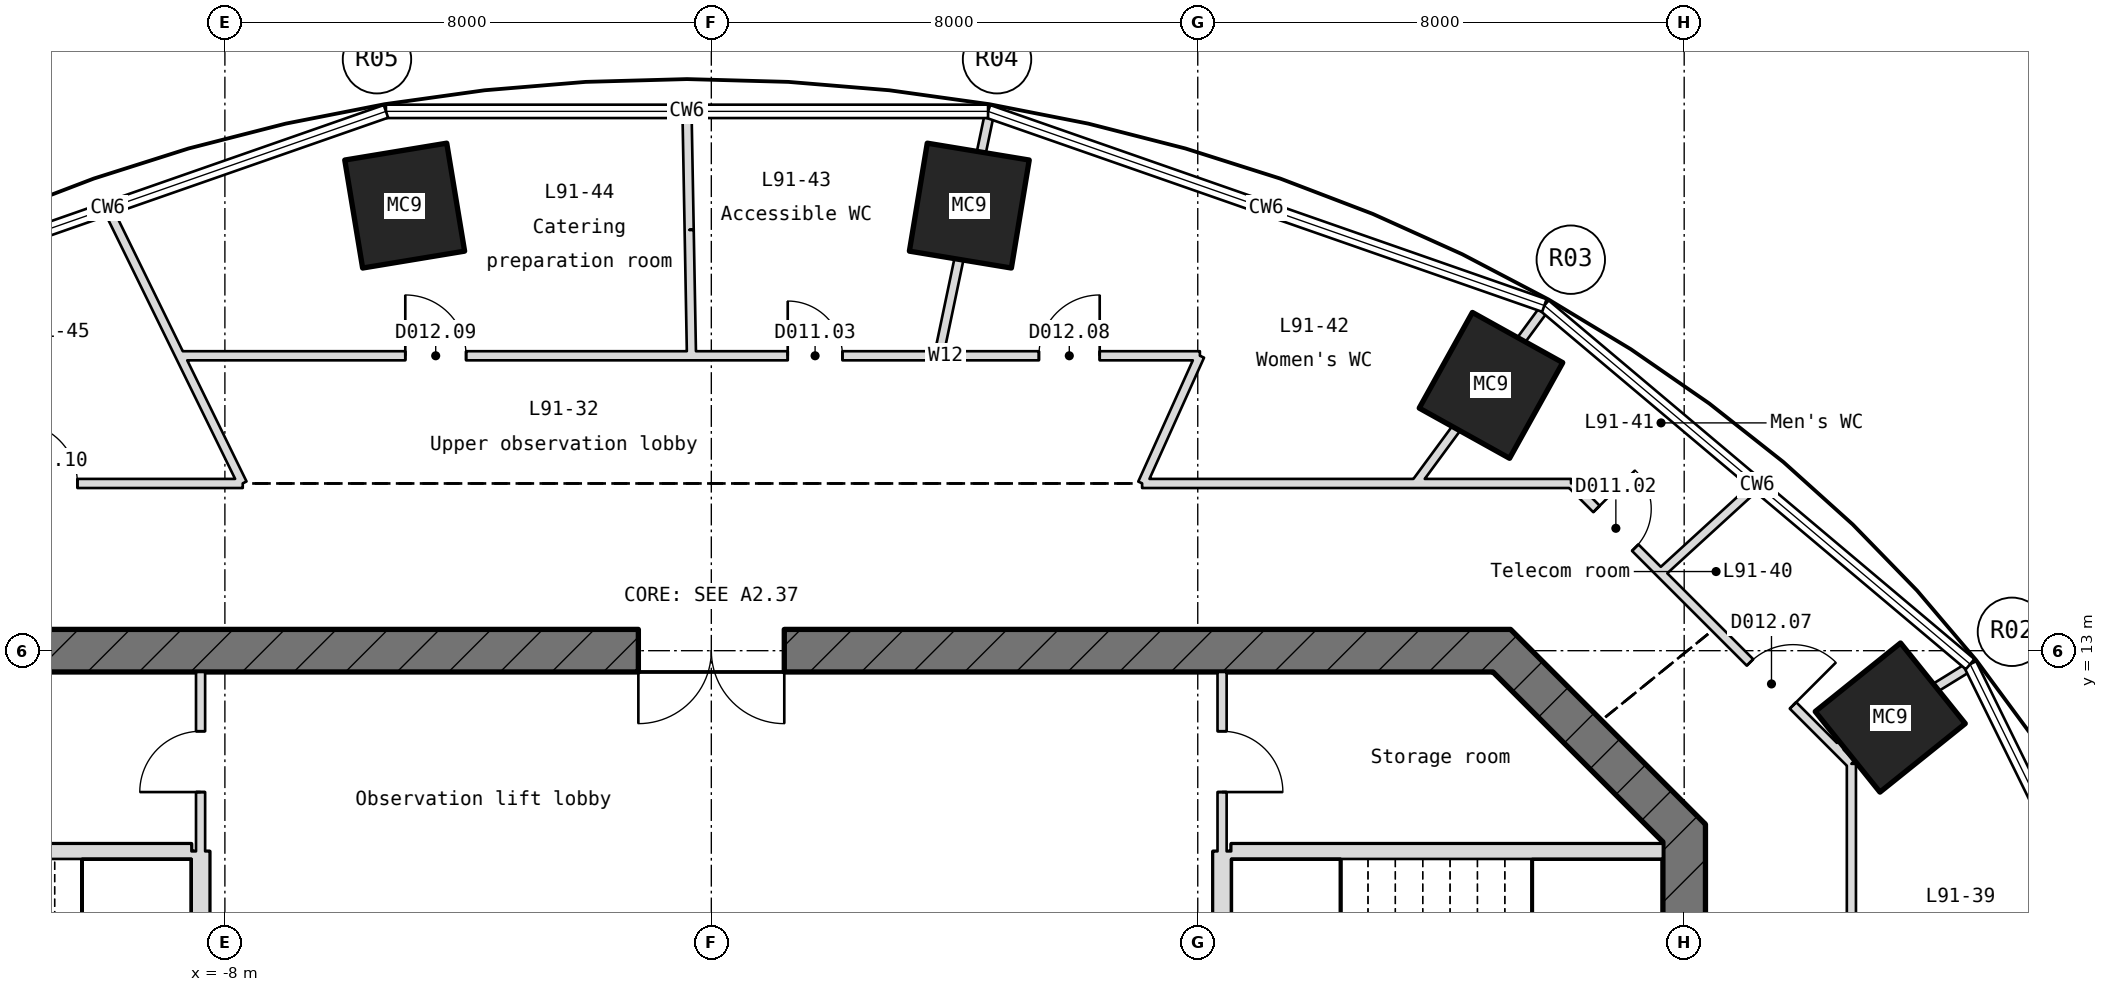
"""IFC4 building model, lengths in metres.
Left out: names, types, materials, properties, quantities, classifications, styles, units other than length and angle.
Written with IfcOpenShell. Run it as: python <this file> out.ifc"""

import sys

from ifc_helpers import new_model, si_unit, direction, frame, frame_2d, origin, origin_2d, place, context, subcontext, project, spatial, rectangle, hollow_rectangle, extrude, element, fill, save


model = new_model("IFC4")
c1 = context("Model", 3, precision=1e-05, world=origin(), true_north=direction((0.0, 1.0)))
c2 = subcontext(c1, "Body", "Model", "MODEL_VIEW")
j1 = project(units=[si_unit("LENGTHUNIT", "METRE"), si_unit("PLANEANGLEUNIT", "RADIAN")], contexts=[c1])
p1 = place(None, origin())
s1 = spatial("IfcSite", under=j1, at=p1, CompositionType="ELEMENT")
p2 = place(p1, origin())
s2 = spatial("IfcBuilding", under=s1, at=p2, CompositionType="ELEMENT")
p3 = place(p2, frame((0.0, 0.0, 401.95)))
s3 = spatial("IfcBuildingStorey", under=s2, at=p3, CompositionType="ELEMENT", Elevation=401.95)
for number, where, z_axis, x_axis in (
    (1, (19.389, 11.9, -0.25), (0.0, 0.0, 1.0), (0.626, -0.78, 0.0)),
    (2, (12.823, 17.363, -0.25), (0.0, 0.0, 1.0), (0.874, -0.486, 0.0)),
    (3, (4.243, 20.32, -0.25), (0.0, 0.0, 1.0), (0.987, -0.163, 0.0)),
    (4, (-5.043, 20.32, -0.25), (0.0, 0.0, 1.0), (0.987, 0.163, 0.0)),
):
    element("IfcColumn", number, at=place(p3, frame(where, z_axis=z_axis, x_axis=x_axis)), inside=s3, PredefinedType="COLUMN", context=c2, shape_type="SweptSolid", body=[
        extrude(hollow_rectangle(XDim=1.7, YDim=1.8, WallThickness=0.05, at=origin_2d()), origin(), (0.0, 0.0, 1.0), 5.55),
    ])
p4 = place(p3, frame((16.0, -10.145, -0.25), z_axis=(0.0, 0.0, 1.0), x_axis=(0.0, 1.0, 0.0)))
e5 = element("IfcWall", 5, at=p4, inside=s3, PredefinedType="SHEAR", context=c2, shape_type="SweptSolid", body=[
    extrude(rectangle(XDim=20.29, YDim=0.7, at=frame_2d((10.145, 0.0))), origin(), (0.0, 0.0, 1.0), 5.55),
])
p5 = place(p4, frame((8.945, 0.0, 0.25)))
e6 = element("IfcOpeningElement", 6, at=p5, cuts=e5, PredefinedType="OPENING", context=c2, shape_type="SweptSolid", body=[
    extrude(rectangle(XDim=2.4, YDim=2.1, at=frame_2d((1.2, 1.05))), frame((0.0, 0.36, 0.0), z_axis=(0.0, -1.0, 0.0), x_axis=(1.0, 0.0, 0.0)), (0.0, 0.0, 1.0), 0.72),
])
p6 = place(p4, frame((13.545, 0.0, 0.25)))
e7 = element("IfcOpeningElement", 7, at=p6, cuts=e5, PredefinedType="OPENING", context=c2, shape_type="SweptSolid", body=[
    extrude(rectangle(XDim=1.2, YDim=2.1, at=frame_2d((0.6, 1.05))), frame((0.0, 0.36, 0.0), z_axis=(0.0, -1.0, 0.0), x_axis=(1.0, 0.0, 0.0)), (0.0, 0.0, 1.0), 0.72),
])
p7 = place(p4, frame((2.4, 0.0, 0.25)))
e8 = element("IfcOpeningElement", 8, at=p7, cuts=e5, PredefinedType="OPENING", context=c2, shape_type="SweptSolid", body=[
    extrude(rectangle(XDim=1.2, YDim=2.1, at=frame_2d((0.6, 1.05))), frame((0.0, 0.36, 0.0), z_axis=(0.0, -1.0, 0.0), x_axis=(1.0, 0.0, 0.0)), (0.0, 0.0, 1.0), 0.72),
])
p8 = place(p3, frame((16.103, 9.897, -0.25), z_axis=(0.0, 0.0, 1.0), x_axis=(-0.707106781187, 0.707106781187, 0.0)))
e9 = element("IfcWall", 9, at=p8, inside=s3, PredefinedType="SHEAR", context=c2, shape_type="SweptSolid", body=[
    extrude(rectangle(XDim=4.533, YDim=0.7, at=frame_2d((2.266, 0.0))), origin(), (0.0, 0.0, 1.0), 5.55),
])
p9 = place(p3, frame((13.145, 13.0, -0.25), z_axis=(0.0, 0.0, 1.0), x_axis=(-1.0, 0.0, 0.0)))
e10 = element("IfcWall", 10, at=p9, inside=s3, PredefinedType="SHEAR", context=c2, shape_type="SweptSolid", body=[
    extrude(rectangle(XDim=26.29, YDim=0.7, at=frame_2d((13.145, 0.0))), origin(), (0.0, 0.0, 1.0), 5.55),
])
p10 = place(p9, frame((11.945, 0.0, 0.25)))
e11 = element("IfcOpeningElement", 11, at=p10, cuts=e10, PredefinedType="OPENING", context=c2, shape_type="SweptSolid", body=[
    extrude(rectangle(XDim=2.4, YDim=2.1, at=frame_2d((1.2, 1.05))), frame((0.0, 0.36, 0.0), z_axis=(0.0, -1.0, 0.0), x_axis=(1.0, 0.0, 0.0)), (0.0, 0.0, 1.0), 0.72),
])
for number, where, z_axis, x_axis in (
    (12, (-15.65, 9.7, -0.25), (0.0, 0.0, 1.0), (1.0, 0.0, 0.0)),
    (13, (8.55, 9.7, -0.25), (0.0, 0.0, 1.0), (1.0, 0.0, 0.0)),
):
    element("IfcWall", number, at=place(p3, frame(where, z_axis=z_axis, x_axis=x_axis)), inside=s3, PredefinedType="SHEAR", context=c2, shape_type="SweptSolid", body=[
        extrude(rectangle(XDim=7.1, YDim=0.25, at=frame_2d((3.55, 0.0))), origin(), (0.0, 0.0, 1.0), 5.55),
    ])
p11 = place(p3, frame((-8.4, 8.35, -0.25), z_axis=(0.0, 0.0, 1.0), x_axis=(0.0, 1.0, 0.0)))
e14 = element("IfcWall", 14, at=p11, inside=s3, PredefinedType="SHEAR", context=c2, shape_type="SweptSolid", body=[
    extrude(rectangle(XDim=1.35, YDim=0.3, at=frame_2d((0.675, 0.0))), origin(), (0.0, 0.0, 1.0), 5.55),
])
p12 = place(p3, frame((-8.4, 9.7, 0.0), z_axis=(0.0, 0.0, 1.0), x_axis=(0.0, 1.0, 0.0)))
e15 = element("IfcWall", 15, at=p12, inside=s3, PredefinedType="PARTITIONING", context=c2, shape_type="SweptSolid", body=[
    extrude(rectangle(XDim=2.95, YDim=0.15, at=frame_2d((1.475, 0.0))), origin(), (0.0, 0.0, 1.0), 5.3),
])
p13 = place(p12, frame((0.975, 0.0, 0.0)))
e16 = element("IfcOpeningElement", 16, at=p13, cuts=e15, PredefinedType="OPENING", context=c2, shape_type="SweptSolid", body=[
    extrude(rectangle(XDim=1.0, YDim=2.1, at=frame_2d((0.5, 1.05))), frame((0.0, 0.085, 0.0), z_axis=(0.0, -1.0, 0.0), x_axis=(1.0, 0.0, 0.0)), (0.0, 0.0, 1.0), 0.17),
])
p14 = place(p3, frame((8.4, 8.35, -0.25), z_axis=(0.0, 0.0, 1.0), x_axis=(0.0, 1.0, 0.0)))
e17 = element("IfcWall", 17, at=p14, inside=s3, PredefinedType="SHEAR", context=c2, shape_type="SweptSolid", body=[
    extrude(rectangle(XDim=1.35, YDim=0.3, at=frame_2d((0.675, 0.0))), origin(), (0.0, 0.0, 1.0), 5.55),
])
p15 = place(p3, frame((8.4, 9.7, 0.0), z_axis=(0.0, 0.0, 1.0), x_axis=(0.0, 1.0, 0.0)))
e18 = element("IfcWall", 18, at=p15, inside=s3, PredefinedType="PARTITIONING", context=c2, shape_type="SweptSolid", body=[
    extrude(rectangle(XDim=2.95, YDim=0.15, at=frame_2d((1.475, 0.0))), origin(), (0.0, 0.0, 1.0), 5.3),
])
p16 = place(p15, frame((0.975, 0.0, 0.0)))
e19 = element("IfcOpeningElement", 19, at=p16, cuts=e18, PredefinedType="OPENING", context=c2, shape_type="SweptSolid", body=[
    extrude(rectangle(XDim=1.0, YDim=2.1, at=frame_2d((0.5, 1.05))), frame((0.0, 0.085, 0.0), z_axis=(0.0, -1.0, 0.0), x_axis=(1.0, 0.0, 0.0)), (0.0, 0.0, 1.0), 0.17),
])
p17 = place(p3, frame((-14.139, 15.75, 0.0), z_axis=(0.0, 0.0, 1.0), x_axis=(1.0, 0.0, 0.0)))
e20 = element("IfcWall", 20, at=p17, inside=s3, PredefinedType="PARTITIONING", context=c2, shape_type="SweptSolid", body=[
    extrude(rectangle(XDim=6.433, YDim=0.15, at=frame_2d((3.216, 0.0))), origin(), (0.0, 0.0, 1.0), 5.3),
])
p18 = place(p17, frame((2.714, 0.0, 0.0)))
e21 = element("IfcOpeningElement", 21, at=p18, cuts=e20, PredefinedType="OPENING", context=c2, shape_type="SweptSolid", body=[
    extrude(rectangle(XDim=1.0, YDim=2.1, at=frame_2d((0.5, 1.05))), frame((0.0, 0.085, 0.0), z_axis=(0.0, -1.0, 0.0), x_axis=(1.0, 0.0, 0.0)), (0.0, 0.0, 1.0), 0.17),
])
p19 = place(p3, frame((-8.74, 17.85, 0.0), z_axis=(0.0, 0.0, 1.0), x_axis=(1.0, 0.0, 0.0)))
e22 = element("IfcWall", 22, at=p19, inside=s3, PredefinedType="PARTITIONING", context=c2, shape_type="SweptSolid", body=[
    extrude(rectangle(XDim=8.418, YDim=0.15, at=frame_2d((4.209, 0.0))), origin(), (0.0, 0.0, 1.0), 5.3),
])
p20 = place(p19, frame((3.707, 0.0, 0.0)))
e23 = element("IfcOpeningElement", 23, at=p20, cuts=e22, PredefinedType="OPENING", context=c2, shape_type="SweptSolid", body=[
    extrude(rectangle(XDim=1.0, YDim=2.1, at=frame_2d((0.5, 1.05))), frame((0.0, 0.085, 0.0), z_axis=(0.0, -1.0, 0.0), x_axis=(1.0, 0.0, 0.0)), (0.0, 0.0, 1.0), 0.17),
])
p21 = place(p3, frame((18.501, 11.388, 0.0), z_axis=(0.0, 0.0, 1.0), x_axis=(0.851577096896, 0.524229384946, 0.0)))
e24 = element("IfcWall", 24, at=p21, inside=s3, PredefinedType="PARTITIONING", context=c2, shape_type="SweptSolid", body=[
    extrude(rectangle(XDim=2.581, YDim=0.15, at=frame_2d((1.29, 0.0))), origin(), (0.0, 0.0, 1.0), 5.3),
])
p22 = place(p3, frame((18.75, -11.139, 0.0), z_axis=(0.0, 0.0, 1.0), x_axis=(0.0, 1.0, 0.0)))
e25 = element("IfcWall", 25, at=p22, inside=s3, PredefinedType="PARTITIONING", context=c2, shape_type="SweptSolid", body=[
    extrude(rectangle(XDim=22.278, YDim=0.15, at=frame_2d((11.139, 0.0))), origin(), (0.0, 0.0, 1.0), 5.3),
])
p23 = place(p22, frame((5.998, 0.0, 0.0)))
e26 = element("IfcOpeningElement", 26, at=p23, cuts=e25, PredefinedType="OPENING", context=c2, shape_type="SweptSolid", body=[
    extrude(rectangle(XDim=1.0, YDim=2.1, at=frame_2d((0.5, 1.05))), frame((0.0, 0.085, 0.0), z_axis=(0.0, -1.0, 0.0), x_axis=(1.0, 0.0, 0.0)), (0.0, 0.0, 1.0), 0.17),
])
p24 = place(p22, frame((16.553, 0.0, 0.0)))
e27 = element("IfcOpeningElement", 27, at=p24, cuts=e25, PredefinedType="OPENING", context=c2, shape_type="SweptSolid", body=[
    extrude(rectangle(XDim=1.0, YDim=2.1, at=frame_2d((0.5, 1.05))), frame((0.0, 0.085, 0.0), z_axis=(0.0, -1.0, 0.0), x_axis=(1.0, 0.0, 0.0)), (0.0, 0.0, 1.0), 0.17),
])
p25 = place(p3, frame((-7.711, 15.75, 0.0), z_axis=(0.0, 0.0, 1.0), x_axis=(-0.439721633325, 0.89813411314, 0.0)))
e28 = element("IfcWall", 28, at=p25, inside=s3, PredefinedType="PARTITIONING", context=c2, shape_type="SweptSolid", body=[
    extrude(rectangle(XDim=5.016, YDim=0.15, at=frame_2d((2.508, 0.0))), origin(), (0.0, 0.0, 1.0), 5.3),
])
p26 = place(p3, frame((18.75, 11.139, 0.0), z_axis=(0.0, 0.0, 1.0), x_axis=(-0.707106781187, 0.707106781187, 0.0)))
e29 = element("IfcWall", 29, at=p26, inside=s3, PredefinedType="PARTITIONING", context=c2, shape_type="SweptSolid", body=[
    extrude(rectangle(XDim=4.44, YDim=0.15, at=frame_2d((2.22, 0.0))), origin(), (0.0, 0.0, 1.0), 5.3),
])
p27 = place(p26, frame((1.359, 0.0, 0.0)))
e30 = element("IfcOpeningElement", 30, at=p27, cuts=e29, PredefinedType="OPENING", context=c2, shape_type="SweptSolid", body=[
    extrude(rectangle(XDim=1.0, YDim=2.1, at=frame_2d((0.5, 1.05))), frame((0.0, 0.085, 0.0), z_axis=(0.0, -1.0, 0.0), x_axis=(1.0, 0.0, 0.0)), (0.0, 0.0, 1.0), 0.17),
])
p28 = place(p3, frame((7.085, 15.75, 0.0), z_axis=(0.0, 0.0, 1.0), x_axis=(1.0, 0.0, 0.0)))
e31 = element("IfcWall", 31, at=p28, inside=s3, PredefinedType="PARTITIONING", context=c2, shape_type="SweptSolid", body=[
    extrude(rectangle(XDim=7.054, YDim=0.15, at=frame_2d((3.527, 0.0))), origin(), (0.0, 0.0, 1.0), 5.3),
])
p29 = place(p3, frame((-0.332, 17.85, 0.0), z_axis=(0.0, 0.0, 1.0), x_axis=(1.0, 0.0, 0.0)))
e32 = element("IfcWall", 32, at=p29, inside=s3, PredefinedType="PARTITIONING", context=c2, shape_type="SweptSolid", body=[
    extrude(rectangle(XDim=8.367, YDim=0.15, at=frame_2d((4.183, 0.0))), origin(), (0.0, 0.0, 1.0), 5.3),
])
p30 = place(p29, frame((5.719, 0.0, 0.0)))
e33 = element("IfcOpeningElement", 33, at=p30, cuts=e32, PredefinedType="OPENING", context=c2, shape_type="SweptSolid", body=[
    extrude(rectangle(XDim=1.0, YDim=2.1, at=frame_2d((0.5, 1.05))), frame((0.0, 0.085, 0.0), z_axis=(0.0, -1.0, 0.0), x_axis=(1.0, 0.0, 0.0)), (0.0, 0.0, 1.0), 0.17),
])
p31 = place(p29, frame((1.588, 0.0, 0.0)))
e34 = element("IfcOpeningElement", 34, at=p31, cuts=e32, PredefinedType="OPENING", context=c2, shape_type="SweptSolid", body=[
    extrude(rectangle(XDim=0.9, YDim=2.1, at=frame_2d((0.45, 1.05))), frame((0.0, 0.085, 0.0), z_axis=(0.0, -1.0, 0.0), x_axis=(1.0, 0.0, 0.0)), (0.0, 0.0, 1.0), 0.17),
])
p32 = place(p3, frame((15.614, 14.276, 0.0), z_axis=(0.0, 0.0, 1.0), x_axis=(0.738014143535, 0.674785242831, 0.0)))
e35 = element("IfcWall", 35, at=p32, inside=s3, PredefinedType="PARTITIONING", context=c2, shape_type="SweptSolid", body=[
    extrude(rectangle(XDim=2.131, YDim=0.15, at=frame_2d((1.066, 0.0))), origin(), (0.0, 0.0, 1.0), 5.3),
])
p33 = place(p3, frame((11.585, 15.75, 0.0), z_axis=(0.0, 0.0, 1.0), x_axis=(0.592547779952, 0.805535305542, 0.0)))
e36 = element("IfcWall", 36, at=p33, inside=s3, PredefinedType="PARTITIONING", context=c2, shape_type="SweptSolid", body=[
    extrude(rectangle(XDim=1.126, YDim=0.15, at=frame_2d((0.563, 0.0))), origin(), (0.0, 0.0, 1.0), 4.459),
])
p34 = place(p3, frame((12.252, 16.657, 0.0), z_axis=(0.0, 0.0, 1.0), x_axis=(0.592505845227, 0.805566150836, 0.0)))
e37 = element("IfcWall", 37, at=p34, inside=s3, PredefinedType="PARTITIONING", context=c2, shape_type="SweptSolid", body=[
    extrude(rectangle(XDim=2.464, YDim=0.15, at=frame_2d((1.232, 0.0))), origin(), (0.0, 0.0, 1.0), 5.3),
])
p35 = place(p3, frame((7.09, 15.75, 0.0), z_axis=(0.0, 0.0, 1.0), x_axis=(0.41046164667, 0.911877862772, 0.0)))
e38 = element("IfcWall", 38, at=p35, inside=s3, PredefinedType="PARTITIONING", context=c2, shape_type="SweptSolid", body=[
    extrude(rectangle(XDim=2.303, YDim=0.15, at=frame_2d((1.151, 0.0))), origin(), (0.0, 0.0, 1.0), 5.3),
])
p36 = place(p3, frame((3.74, 17.85, 0.0), z_axis=(0.0, 0.0, 1.0), x_axis=(0.205037817334, 0.978754051569, 0.0)))
e39 = element("IfcWall", 39, at=p36, inside=s3, PredefinedType="PARTITIONING", context=c2, shape_type="SweptSolid", body=[
    extrude(rectangle(XDim=1.619, YDim=0.15, at=frame_2d((0.81, 0.0))), origin(), (0.0, 0.0, 1.0), 4.459),
])
p37 = place(p3, frame((4.072, 19.435, 0.0), z_axis=(0.0, 0.0, 1.0), x_axis=(0.205108906394, 0.978739156526, 0.0)))
e40 = element("IfcWall", 40, at=p37, inside=s3, PredefinedType="PARTITIONING", context=c2, shape_type="SweptSolid", body=[
    extrude(rectangle(XDim=2.457, YDim=0.15, at=frame_2d((1.229, 0.0))), origin(), (0.0, 0.0, 1.0), 5.3),
])
p38 = place(p3, frame((-0.326, 17.85, 0.0), z_axis=(0.0, 0.0, 1.0), x_axis=(-0.018277403929, 0.999832954301, 0.0)))
e41 = element("IfcWall", 41, at=p38, inside=s3, PredefinedType="PARTITIONING", context=c2, shape_type="SweptSolid", body=[
    extrude(rectangle(XDim=2.07, YDim=0.15, at=frame_2d((1.035, 0.0))), origin(), (0.0, 0.0, 1.0), 4.947),
])
p39 = place(p3, frame((-0.364, 19.92, 0.0), z_axis=(0.0, 0.0, 1.0), x_axis=(-0.018349017615, 0.999831642604, 0.0)))
e42 = element("IfcWall", 42, at=p39, inside=s3, PredefinedType="PARTITIONING", context=c2, shape_type="SweptSolid", body=[
    extrude(rectangle(XDim=1.929, YDim=0.15, at=frame_2d((0.965, 0.0))), origin(), (0.0, 0.0, 1.0), 5.3),
])
p40 = place(p3, frame((15.617, 14.272, 0.0), z_axis=(0.0, 0.0, 1.0), x_axis=(-0.707106781187, 0.707106781187, 0.0)))
e43 = element("IfcWall", 43, at=p40, inside=s3, PredefinedType="PARTITIONING", context=c2, shape_type="SweptSolid", body=[
    extrude(rectangle(XDim=2.09, YDim=0.15, at=frame_2d((1.045, 0.0))), origin(), (0.0, 0.0, 1.0), 5.3),
])
p41 = place(p40, frame((0.598, 0.0, 0.0)))
e44 = element("IfcOpeningElement", 44, at=p41, cuts=e43, PredefinedType="OPENING", context=c2, shape_type="SweptSolid", body=[
    extrude(rectangle(XDim=0.9, YDim=2.1, at=frame_2d((0.45, 1.05))), frame((0.0, 0.085, 0.0), z_axis=(0.0, -1.0, 0.0), x_axis=(1.0, 0.0, 0.0)), (0.0, 0.0, 1.0), 0.17),
])
p42 = place(p10, origin())
e45 = element("IfcDoor", 45, at=p42, inside=s3, OperationType="DOUBLE_DOOR_SINGLE_SWING", PredefinedType="DOOR", context=c2, shape_type="SweptSolid", body=[
    extrude(rectangle(XDim=2.4, YDim=2.1, at=frame_2d((1.2, 1.05))), frame((0.0, 0.025, 0.0), z_axis=(0.0, -1.0, 0.0), x_axis=(1.0, 0.0, 0.0)), (0.0, 0.0, 1.0), 0.05),
])
fill(e11, e45)
p43 = place(p13, origin())
e46 = element("IfcDoor", 46, at=p43, inside=s3, OperationType="SINGLE_SWING_RIGHT", PredefinedType="DOOR", context=c2, shape_type="SweptSolid", body=[
    extrude(rectangle(XDim=1.0, YDim=2.1, at=frame_2d((0.5, 1.05))), frame((0.0, 0.025, 0.0), z_axis=(0.0, -1.0, 0.0), x_axis=(1.0, 0.0, 0.0)), (0.0, 0.0, 1.0), 0.05),
])
fill(e16, e46)
p44 = place(p16, frame((1.0, 0.0, 0.0), z_axis=(0.0, 0.0, 1.0), x_axis=(-1.0, 0.0, 0.0)))
e47 = element("IfcDoor", 47, at=p44, inside=s3, OperationType="SINGLE_SWING_LEFT", PredefinedType="DOOR", context=c2, shape_type="SweptSolid", body=[
    extrude(rectangle(XDim=1.0, YDim=2.1, at=frame_2d((0.5, 1.05))), frame((0.0, 0.025, 0.0), z_axis=(0.0, -1.0, 0.0), x_axis=(1.0, 0.0, 0.0)), (0.0, 0.0, 1.0), 0.05),
])
fill(e19, e47)
p45 = place(p27, frame((1.0, 0.0, 0.0), z_axis=(0.0, 0.0, 1.0), x_axis=(-1.0, 0.0, 0.0)))
e48 = element("IfcDoor", 48, at=p45, inside=s3, OperationType="SINGLE_SWING_LEFT", PredefinedType="DOOR", context=c2, shape_type="SweptSolid", body=[
    extrude(rectangle(XDim=1.0, YDim=2.1, at=frame_2d((0.5, 1.05))), frame((0.0, 0.025, 0.0), z_axis=(0.0, -1.0, 0.0), x_axis=(1.0, 0.0, 0.0)), (0.0, 0.0, 1.0), 0.05),
])
fill(e30, e48)
p46 = place(p41, frame((0.9, 0.0, 0.0), z_axis=(0.0, 0.0, 1.0), x_axis=(-1.0, 0.0, 0.0)))
e49 = element("IfcDoor", 49, at=p46, inside=s3, OperationType="SINGLE_SWING_LEFT", PredefinedType="DOOR", context=c2, shape_type="SweptSolid", body=[
    extrude(rectangle(XDim=0.9, YDim=2.1, at=frame_2d((0.45, 1.05))), frame((0.0, 0.025, 0.0), z_axis=(0.0, -1.0, 0.0), x_axis=(1.0, 0.0, 0.0)), (0.0, 0.0, 1.0), 0.05),
])
fill(e44, e49)
p47 = place(p30, origin())
e50 = element("IfcDoor", 50, at=p47, inside=s3, OperationType="SINGLE_SWING_RIGHT", PredefinedType="DOOR", context=c2, shape_type="SweptSolid", body=[
    extrude(rectangle(XDim=1.0, YDim=2.1, at=frame_2d((0.5, 1.05))), frame((0.0, 0.025, 0.0), z_axis=(0.0, -1.0, 0.0), x_axis=(1.0, 0.0, 0.0)), (0.0, 0.0, 1.0), 0.05),
])
fill(e33, e50)
p48 = place(p31, origin())
e51 = element("IfcDoor", 51, at=p48, inside=s3, OperationType="SINGLE_SWING_RIGHT", PredefinedType="DOOR", context=c2, shape_type="SweptSolid", body=[
    extrude(rectangle(XDim=0.9, YDim=2.1, at=frame_2d((0.45, 1.05))), frame((0.0, 0.025, 0.0), z_axis=(0.0, -1.0, 0.0), x_axis=(1.0, 0.0, 0.0)), (0.0, 0.0, 1.0), 0.05),
])
fill(e34, e51)
p49 = place(p20, origin())
e52 = element("IfcDoor", 52, at=p49, inside=s3, OperationType="SINGLE_SWING_RIGHT", PredefinedType="DOOR", context=c2, shape_type="SweptSolid", body=[
    extrude(rectangle(XDim=1.0, YDim=2.1, at=frame_2d((0.5, 1.05))), frame((0.0, 0.025, 0.0), z_axis=(0.0, -1.0, 0.0), x_axis=(1.0, 0.0, 0.0)), (0.0, 0.0, 1.0), 0.05),
])
fill(e23, e52)
p50 = place(p18, origin())
e53 = element("IfcDoor", 53, at=p50, inside=s3, OperationType="SINGLE_SWING_RIGHT", PredefinedType="DOOR", context=c2, shape_type="SweptSolid", body=[
    extrude(rectangle(XDim=1.0, YDim=2.1, at=frame_2d((0.5, 1.05))), frame((0.0, 0.025, 0.0), z_axis=(0.0, -1.0, 0.0), x_axis=(1.0, 0.0, 0.0)), (0.0, 0.0, 1.0), 0.05),
])
fill(e21, e53)
save(model, sys.argv[1])
